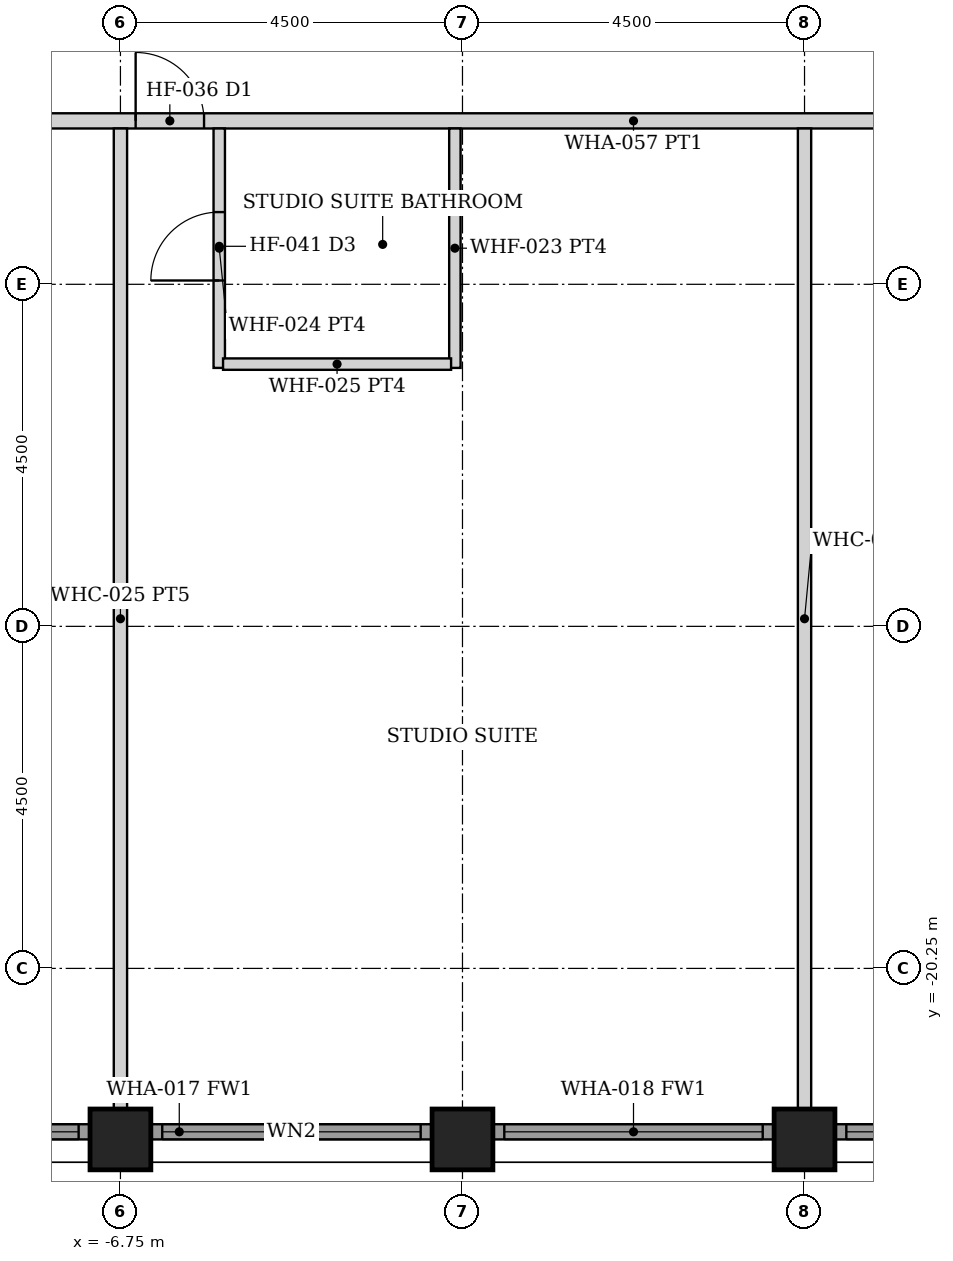
"""IFC4 building model, lengths in metres.
Left out: names, types, materials, properties, quantities, classifications, styles, units other than length and angle.
Written with IfcOpenShell. Run it as: python <this file> out.ifc"""

import sys

from ifc_helpers import new_model, si_unit, direction, frame, frame_2d, origin, origin_2d, place, context, subcontext, project, spatial, rectangle, hollow_rectangle, extrude, element, fill, save


model = new_model("IFC4")
c1 = context("Model", 3, precision=1e-05, world=origin(), true_north=direction((0.0, 1.0)))
c2 = subcontext(c1, "Body", "Model", "MODEL_VIEW")
j1 = project(units=[si_unit("LENGTHUNIT", "METRE"), si_unit("PLANEANGLEUNIT", "RADIAN")], contexts=[c1])
p1 = place(None, origin())
s1 = spatial("IfcSite", under=j1, at=p1, CompositionType="ELEMENT")
p2 = place(p1, origin())
s2 = spatial("IfcBuilding", under=s1, at=p2, CompositionType="ELEMENT")
p3 = place(p2, frame((0.0, 0.0, 172.4)))
s3 = spatial("IfcBuildingStorey", under=s2, at=p3, CompositionType="ELEMENT", Elevation=172.4)
for number, where, z_axis, x_axis in (
    (1, (-6.75, -22.5, 0.0), (0.0, 0.0, 1.0), (0.0, 1.0, 0.0)),
    (2, (-2.25, -22.5, 0.0), (0.0, 0.0, 1.0), (0.0, 1.0, 0.0)),
    (3, (2.25, -22.5, 0.0), (0.0, 0.0, 1.0), (0.0, 1.0, 0.0)),
):
    element("IfcColumn", number, at=place(p3, frame(where, z_axis=z_axis, x_axis=x_axis)), inside=s3, PredefinedType="COLUMN", context=c2, shape_type="SweptSolid", body=[
        extrude(hollow_rectangle(XDim=0.8, YDim=0.8, WallThickness=0.045, at=origin_2d()), origin(), (0.0, 0.0, 1.0), 3.6),
    ])
p4 = place(p3, frame((-10.845, -22.4, 0.0), z_axis=(0.0, 0.0, 1.0), x_axis=(1.0, 0.0, 0.0)))
e4 = element("IfcWall", 4, at=p4, inside=s3, PredefinedType="SOLIDWALL", context=c2, shape_type="SweptSolid", body=[
    extrude(rectangle(XDim=3.69, YDim=0.2, at=frame_2d((1.845, 0.0))), origin(), (0.0, 0.0, 1.0), 2.479),
])
p5 = place(p4, frame((0.145, 0.0, 0.3)))
e5 = element("IfcOpeningElement", 5, at=p5, cuts=e4, PredefinedType="OPENING", context=c2, shape_type="SweptSolid", body=[
    extrude(rectangle(XDim=3.4, YDim=2.029, at=frame_2d((1.7, 1.015))), frame((0.0, 0.11, 0.0), z_axis=(0.0, -1.0, 0.0), x_axis=(1.0, 0.0, 0.0)), (0.0, 0.0, 1.0), 0.22),
])
p6 = place(p3, frame((-6.345, -22.4, 0.0), z_axis=(0.0, 0.0, 1.0), x_axis=(1.0, 0.0, 0.0)))
e6 = element("IfcWall", 6, at=p6, inside=s3, PredefinedType="SOLIDWALL", context=c2, shape_type="SweptSolid", body=[
    extrude(rectangle(XDim=3.69, YDim=0.2, at=frame_2d((1.845, 0.0))), origin(), (0.0, 0.0, 1.0), 2.479),
])
p7 = place(p6, frame((0.145, 0.0, 0.3)))
e7 = element("IfcOpeningElement", 7, at=p7, cuts=e6, PredefinedType="OPENING", context=c2, shape_type="SweptSolid", body=[
    extrude(rectangle(XDim=3.4, YDim=2.029, at=frame_2d((1.7, 1.015))), frame((0.0, 0.11, 0.0), z_axis=(0.0, -1.0, 0.0), x_axis=(1.0, 0.0, 0.0)), (0.0, 0.0, 1.0), 0.22),
])
p8 = place(p3, frame((-1.845, -22.4, 0.0), z_axis=(0.0, 0.0, 1.0), x_axis=(1.0, 0.0, 0.0)))
e8 = element("IfcWall", 8, at=p8, inside=s3, PredefinedType="SOLIDWALL", context=c2, shape_type="SweptSolid", body=[
    extrude(rectangle(XDim=3.69, YDim=0.2, at=frame_2d((1.845, 0.0))), origin(), (0.0, 0.0, 1.0), 2.479),
])
p9 = place(p8, frame((0.145, 0.0, 0.3)))
e9 = element("IfcOpeningElement", 9, at=p9, cuts=e8, PredefinedType="OPENING", context=c2, shape_type="SweptSolid", body=[
    extrude(rectangle(XDim=3.4, YDim=2.029, at=frame_2d((1.7, 1.015))), frame((0.0, 0.11, 0.0), z_axis=(0.0, -1.0, 0.0), x_axis=(1.0, 0.0, 0.0)), (0.0, 0.0, 1.0), 0.22),
])
p10 = place(p3, frame((2.655, -22.4, 0.0), z_axis=(0.0, 0.0, 1.0), x_axis=(1.0, 0.0, 0.0)))
e10 = element("IfcWall", 10, at=p10, inside=s3, PredefinedType="SOLIDWALL", context=c2, shape_type="SweptSolid", body=[
    extrude(rectangle(XDim=3.69, YDim=0.2, at=frame_2d((1.845, 0.0))), origin(), (0.0, 0.0, 1.0), 2.479),
])
p11 = place(p10, frame((0.145, 0.0, 0.3)))
e11 = element("IfcOpeningElement", 11, at=p11, cuts=e10, PredefinedType="OPENING", context=c2, shape_type="SweptSolid", body=[
    extrude(rectangle(XDim=3.4, YDim=2.029, at=frame_2d((1.7, 1.015))), frame((0.0, 0.11, 0.0), z_axis=(0.0, -1.0, 0.0), x_axis=(1.0, 0.0, 0.0)), (0.0, 0.0, 1.0), 0.22),
])
p12 = place(p3, frame((-22.3, -9.1, 0.0), z_axis=(0.0, 0.0, 1.0), x_axis=(1.0, 0.0, 0.0)))
e12 = element("IfcWall", 12, at=p12, inside=s3, PredefinedType="PARTITIONING", context=c2, shape_type="SweptSolid", body=[
    extrude(rectangle(XDim=44.6, YDim=0.2, at=frame_2d((22.3, 0.0))), origin(), (0.0, 0.0, 1.0), 2.473),
])
p13 = place(p12, frame((6.75, 0.0, 0.0)))
e13 = element("IfcOpeningElement", 13, at=p13, cuts=e12, PredefinedType="OPENING", context=c2, shape_type="SweptSolid", body=[
    extrude(rectangle(XDim=0.9, YDim=2.1, at=frame_2d((0.45, 1.05))), frame((0.0, 0.11, 0.0), z_axis=(0.0, -1.0, 0.0), x_axis=(1.0, 0.0, 0.0)), (0.0, 0.0, 1.0), 0.22),
])
p14 = place(p12, frame((15.75, 0.0, 0.0)))
e14 = element("IfcOpeningElement", 14, at=p14, cuts=e12, PredefinedType="OPENING", context=c2, shape_type="SweptSolid", body=[
    extrude(rectangle(XDim=0.9, YDim=2.1, at=frame_2d((0.45, 1.05))), frame((0.0, 0.11, 0.0), z_axis=(0.0, -1.0, 0.0), x_axis=(1.0, 0.0, 0.0)), (0.0, 0.0, 1.0), 0.22),
])
p15 = place(p12, frame((32.45, 0.0, 0.0)))
e15 = element("IfcOpeningElement", 15, at=p15, cuts=e12, PredefinedType="OPENING", context=c2, shape_type="SweptSolid", body=[
    extrude(rectangle(XDim=0.9, YDim=2.1, at=frame_2d((0.45, 1.05))), frame((0.0, 0.11, 0.0), z_axis=(0.0, -1.0, 0.0), x_axis=(1.0, 0.0, 0.0)), (0.0, 0.0, 1.0), 0.22),
])
p16 = place(p12, frame((33.75, 0.0, 0.0)))
e16 = element("IfcOpeningElement", 16, at=p16, cuts=e12, PredefinedType="OPENING", context=c2, shape_type="SweptSolid", body=[
    extrude(rectangle(XDim=0.9, YDim=2.1, at=frame_2d((0.45, 1.05))), frame((0.0, 0.11, 0.0), z_axis=(0.0, -1.0, 0.0), x_axis=(1.0, 0.0, 0.0)), (0.0, 0.0, 1.0), 0.22),
])
p17 = place(p12, frame((38.85, 0.0, 0.0)))
e17 = element("IfcOpeningElement", 17, at=p17, cuts=e12, PredefinedType="OPENING", context=c2, shape_type="SweptSolid", body=[
    extrude(rectangle(XDim=0.9, YDim=2.1, at=frame_2d((0.45, 1.05))), frame((0.0, 0.11, 0.0), z_axis=(0.0, -1.0, 0.0), x_axis=(1.0, 0.0, 0.0)), (0.0, 0.0, 1.0), 0.22),
])
p18 = place(p12, frame((4.85, 0.0, 0.0)))
e18 = element("IfcOpeningElement", 18, at=p18, cuts=e12, PredefinedType="OPENING", context=c2, shape_type="SweptSolid", body=[
    extrude(rectangle(XDim=0.9, YDim=2.1, at=frame_2d((0.45, 1.05))), frame((0.0, 0.11, 0.0), z_axis=(0.0, -1.0, 0.0), x_axis=(1.0, 0.0, 0.0)), (0.0, 0.0, 1.0), 0.22),
])
p19 = place(p3, frame((-5.45, -12.35, 0.0), z_axis=(0.0, 0.0, 1.0), x_axis=(0.0, 1.0, 0.0)))
e19 = element("IfcWall", 19, at=p19, inside=s3, PredefinedType="PARTITIONING", context=c2, shape_type="SweptSolid", body=[
    extrude(rectangle(XDim=3.15, YDim=0.15, at=frame_2d((1.575, 0.0))), origin(), (0.0, 0.0, 1.0), 2.473),
])
p20 = place(p19, frame((1.15, 0.0, 0.0)))
e20 = element("IfcOpeningElement", 20, at=p20, cuts=e19, PredefinedType="OPENING", context=c2, shape_type="SweptSolid", body=[
    extrude(rectangle(XDim=0.9, YDim=2.1, at=frame_2d((0.45, 1.05))), frame((0.0, 0.085, 0.0), z_axis=(0.0, -1.0, 0.0), x_axis=(1.0, 0.0, 0.0)), (0.0, 0.0, 1.0), 0.17),
])
p21 = place(p3, frame((-2.35, -12.35, 0.0), z_axis=(0.0, 0.0, 1.0), x_axis=(0.0, 1.0, 0.0)))
e21 = element("IfcWall", 21, at=p21, inside=s3, PredefinedType="PARTITIONING", context=c2, shape_type="SweptSolid", body=[
    extrude(rectangle(XDim=3.15, YDim=0.15, at=frame_2d((1.575, 0.0))), origin(), (0.0, 0.0, 1.0), 2.473),
])
p22 = place(p3, frame((-5.4, -12.3, 0.0), z_axis=(0.0, 0.0, 1.0), x_axis=(1.0, 0.0, 0.0)))
e22 = element("IfcWall", 22, at=p22, inside=s3, PredefinedType="PARTITIONING", context=c2, shape_type="SweptSolid", body=[
    extrude(rectangle(XDim=3.0, YDim=0.15, at=frame_2d((1.5, 0.0))), origin(), (0.0, 0.0, 1.0), 2.473),
])
for number, where, z_axis, x_axis in (
    (23, (-6.75, -22.1, 0.0), (0.0, 0.0, 1.0), (0.0, 1.0, 0.0)),
    (24, (2.25, -22.1, 0.0), (0.0, 0.0, 1.0), (0.0, 1.0, 0.0)),
):
    element("IfcWall", number, at=place(p3, frame(where, z_axis=z_axis, x_axis=x_axis)), inside=s3, PredefinedType="PARTITIONING", context=c2, shape_type="SweptSolid", body=[
        extrude(rectangle(XDim=12.9, YDim=0.175, at=frame_2d((6.45, 0.0))), origin(), (0.0, 0.0, 1.0), 2.473),
    ])
p23 = place(p5, origin())
e25 = element("IfcWindow", 25, at=p23, inside=s3, PartitioningType="SINGLE_PANEL", PredefinedType="WINDOW", context=c2, shape_type="SweptSolid", body=[
    extrude(rectangle(XDim=3.4, YDim=2.029, at=frame_2d((1.7, 1.015))), frame((0.0, 0.03, 0.0), z_axis=(0.0, -1.0, 0.0), x_axis=(1.0, 0.0, 0.0)), (0.0, 0.0, 1.0), 0.06),
])
fill(e5, e25)
p24 = place(p7, origin())
e26 = element("IfcWindow", 26, at=p24, inside=s3, PartitioningType="SINGLE_PANEL", PredefinedType="WINDOW", context=c2, shape_type="SweptSolid", body=[
    extrude(rectangle(XDim=3.4, YDim=2.029, at=frame_2d((1.7, 1.015))), frame((0.0, 0.03, 0.0), z_axis=(0.0, -1.0, 0.0), x_axis=(1.0, 0.0, 0.0)), (0.0, 0.0, 1.0), 0.06),
])
fill(e7, e26)
p25 = place(p9, origin())
e27 = element("IfcWindow", 27, at=p25, inside=s3, PartitioningType="SINGLE_PANEL", PredefinedType="WINDOW", context=c2, shape_type="SweptSolid", body=[
    extrude(rectangle(XDim=3.4, YDim=2.029, at=frame_2d((1.7, 1.015))), frame((0.0, 0.03, 0.0), z_axis=(0.0, -1.0, 0.0), x_axis=(1.0, 0.0, 0.0)), (0.0, 0.0, 1.0), 0.06),
])
fill(e9, e27)
p26 = place(p11, origin())
e28 = element("IfcWindow", 28, at=p26, inside=s3, PartitioningType="SINGLE_PANEL", PredefinedType="WINDOW", context=c2, shape_type="SweptSolid", body=[
    extrude(rectangle(XDim=3.4, YDim=2.029, at=frame_2d((1.7, 1.015))), frame((0.0, 0.03, 0.0), z_axis=(0.0, -1.0, 0.0), x_axis=(1.0, 0.0, 0.0)), (0.0, 0.0, 1.0), 0.06),
])
fill(e11, e28)
p27 = place(p14, origin())
e29 = element("IfcDoor", 29, at=p27, inside=s3, OperationType="SINGLE_SWING_LEFT", PredefinedType="DOOR", context=c2, shape_type="SweptSolid", body=[
    extrude(rectangle(XDim=0.9, YDim=2.1, at=frame_2d((0.45, 1.05))), frame((0.0, 0.025, 0.0), z_axis=(0.0, -1.0, 0.0), x_axis=(1.0, 0.0, 0.0)), (0.0, 0.0, 1.0), 0.05),
])
fill(e14, e29)
p28 = place(p20, origin())
e30 = element("IfcDoor", 30, at=p28, inside=s3, OperationType="SINGLE_SWING_LEFT", PredefinedType="DOOR", context=c2, shape_type="SweptSolid", body=[
    extrude(rectangle(XDim=0.9, YDim=2.1, at=frame_2d((0.45, 1.05))), frame((0.0, 0.025, 0.0), z_axis=(0.0, -1.0, 0.0), x_axis=(1.0, 0.0, 0.0)), (0.0, 0.0, 1.0), 0.05),
])
fill(e20, e30)
save(model, sys.argv[1])
